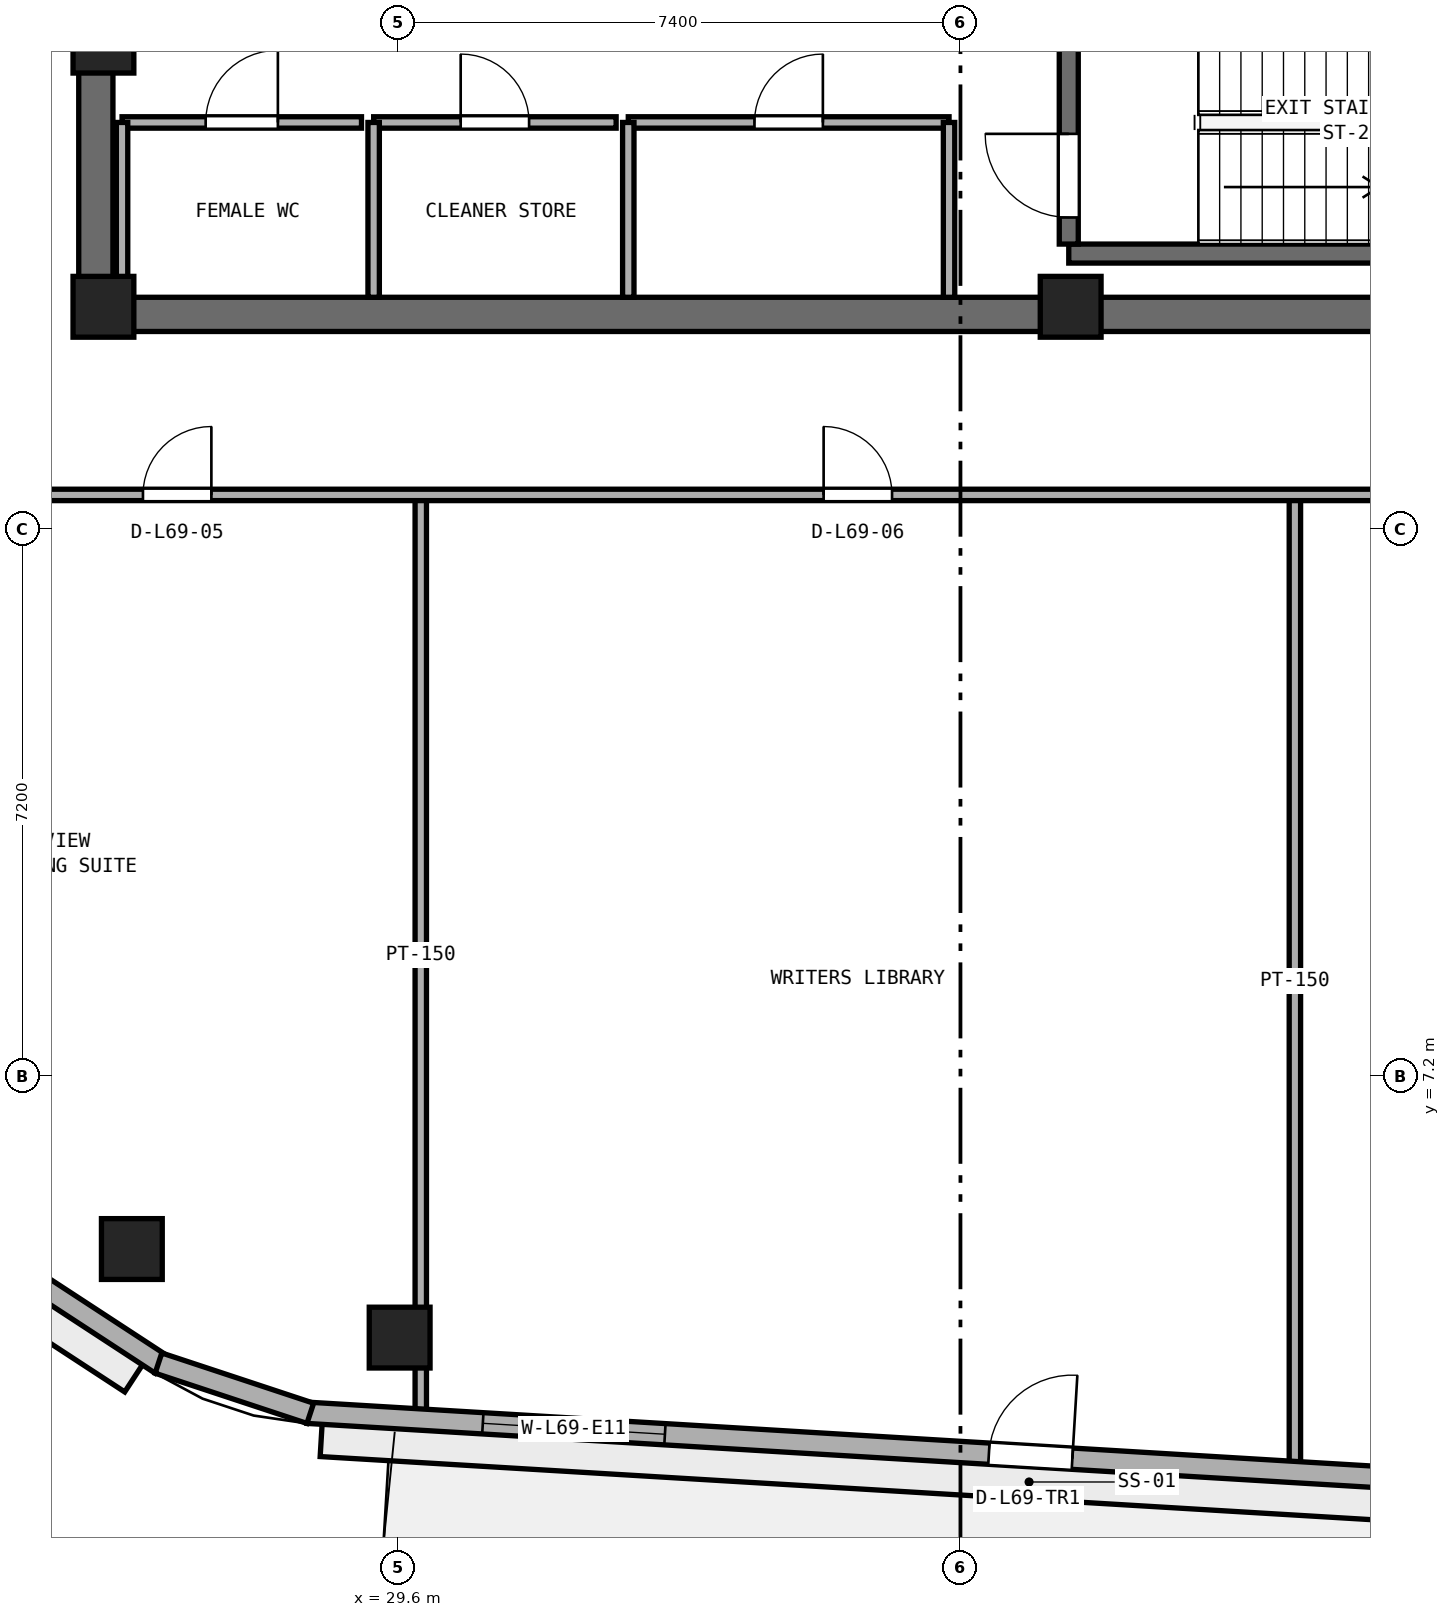
"""IFC4 building model, lengths in metres.
Left out: names, types, materials, properties, quantities, classifications, styles, units other than length and angle.
Written with IfcOpenShell. Run it as: python <this file> out.ifc"""

import sys

from ifc_helpers import new_model, si_unit, direction, frame, frame_2d, origin, origin_2d, place, context, subcontext, project, spatial, rectangle, extrude, element, fill, save


model = new_model("IFC4")
c1 = context("Model", 3, precision=1e-05, world=origin(), true_north=direction((0.0, 1.0)))
c2 = subcontext(c1, "Body", "Model", "MODEL_VIEW")
j1 = project(units=[si_unit("LENGTHUNIT", "METRE"), si_unit("PLANEANGLEUNIT", "RADIAN")], contexts=[c1])
p1 = place(None, origin())
s1 = spatial("IfcSite", under=j1, at=p1, CompositionType="ELEMENT")
p2 = place(p1, origin())
s2 = spatial("IfcBuilding", under=s1, at=p2, CompositionType="ELEMENT")
p3 = place(p2, frame((0.0, 0.0, 270.6)))
s3 = spatial("IfcBuildingStorey", under=s2, at=p3, CompositionType="ELEMENT", Elevation=270.6)
p4 = place(p3, frame((25.4, 17.225, 0.0), z_axis=(0.0, 0.0, 1.0), x_axis=(1.0, 0.0, 0.0)))
e1 = element("IfcWall", 1, at=p4, inside=s3, PredefinedType="SHEAR", context=c2, shape_type="SweptSolid", body=[
    extrude(rectangle(XDim=23.2, YDim=0.45, at=frame_2d((11.6, 0.0))), origin(), (0.0, 0.0, 1.0), 3.54),
])
p5 = place(p3, frame((25.625, 17.45, 0.0), z_axis=(0.0, 0.0, 1.0), x_axis=(0.0, 1.0, 0.0)))
e2 = element("IfcWall", 2, at=p5, inside=s3, PredefinedType="SHEAR", context=c2, shape_type="SweptSolid", body=[
    extrude(rectangle(XDim=15.5, YDim=0.45, at=frame_2d((7.75, 0.0))), origin(), (0.0, 0.0, 1.0), 3.54),
])
p6 = place(p5, frame((7.0, 0.0, 0.0)))
e3 = element("IfcOpeningElement", 3, at=p6, cuts=e2, PredefinedType="OPENING", context=c2, shape_type="SweptSolid", body=[
    extrude(rectangle(XDim=1.5, YDim=2.15, at=frame_2d((0.75, 1.075))), frame((0.0, 0.235, 0.0), z_axis=(0.0, -1.0, 0.0), x_axis=(1.0, 0.0, 0.0)), (0.0, 0.0, 1.0), 0.47),
])
for number, where, z_axis, x_axis in (
    (4, (25.725, 17.325, 0.0), (0.0, 0.0, 1.0), (1.0, 0.0, 0.0)),
    (5, (38.45, 17.325, 0.0), (0.0, 0.0, 1.0), (1.0, 0.0, 0.0)),
    (6, (25.725, 20.8, 0.0), (0.0, 0.0, 1.0), (1.0, 0.0, 0.0)),
):
    element("IfcColumn", number, at=place(p3, frame(where, z_axis=z_axis, x_axis=x_axis)), inside=s3, PredefinedType="PILASTER", context=c2, shape_type="SweptSolid", body=[
        extrude(rectangle(XDim=0.8, YDim=0.8, at=origin_2d()), origin(), (0.0, 0.0, 1.0), 3.8),
    ])
for number, where, z_axis, x_axis in (
    (7, (29.622, 3.764, 0.0), (0.0, 0.0, 1.0), (1.0, 0.0, 0.0)),
    (8, (26.099, 4.929, 0.0), (0.0, 0.0, 1.0), (1.0, 0.0, 0.0)),
):
    element("IfcColumn", number, at=place(p3, frame(where, z_axis=z_axis, x_axis=x_axis)), inside=s3, PredefinedType="COLUMN", context=c2, shape_type="SweptSolid", body=[
        extrude(rectangle(XDim=0.8, YDim=0.8, at=origin_2d()), origin(), (0.0, 0.0, 1.0), 3.8),
    ])
p7 = place(p3, frame((38.425, 18.025, 0.0), z_axis=(0.0, 0.0, 1.0), x_axis=(1.0, 0.0, 0.0)))
e9 = element("IfcWall", 9, at=p7, inside=s3, PredefinedType="SHEAR", context=c2, shape_type="SweptSolid", body=[
    extrude(rectangle(XDim=7.3, YDim=0.25, at=frame_2d((3.65, 0.0))), origin(), (0.0, 0.0, 1.0), 3.54),
])
p8 = place(p3, frame((38.425, 18.15, 0.0), z_axis=(0.0, 0.0, 1.0), x_axis=(0.0, 1.0, 0.0)))
e10 = element("IfcWall", 10, at=p8, inside=s3, PredefinedType="SHEAR", context=c2, shape_type="SweptSolid", body=[
    extrude(rectangle(XDim=3.2, YDim=0.25, at=frame_2d((1.6, 0.0))), origin(), (0.0, 0.0, 1.0), 3.54),
])
p9 = place(p8, frame((0.35, 0.0, 0.0)))
e11 = element("IfcOpeningElement", 11, at=p9, cuts=e10, PredefinedType="OPENING", context=c2, shape_type="SweptSolid", body=[
    extrude(rectangle(XDim=1.1, YDim=2.15, at=frame_2d((0.55, 1.075))), frame((0.0, 0.135, 0.0), z_axis=(0.0, -1.0, 0.0), x_axis=(1.0, 0.0, 0.0)), (0.0, 0.0, 1.0), 0.27),
])
p10 = place(p3, frame((25.97, 19.75, 0.0), z_axis=(0.0, 0.0, 1.0), x_axis=(1.0, 0.0, 0.0)))
e12 = element("IfcWall", 12, at=p10, inside=s3, PredefinedType="PARTITIONING", context=c2, shape_type="SweptSolid", body=[
    extrude(rectangle(XDim=3.15, YDim=0.15, at=frame_2d((1.575, 0.0))), origin(), (0.0, 0.0, 1.0), 3.54),
])
p11 = place(p10, frame((1.1, 0.0, 0.0)))
e13 = element("IfcOpeningElement", 13, at=p11, cuts=e12, PredefinedType="OPENING", context=c2, shape_type="SweptSolid", body=[
    extrude(rectangle(XDim=0.95, YDim=2.1, at=frame_2d((0.475, 1.05))), frame((0.0, 0.085, 0.0), z_axis=(0.0, -1.0, 0.0), x_axis=(1.0, 0.0, 0.0)), (0.0, 0.0, 1.0), 0.17),
])
p12 = place(p3, frame((25.97, 17.45, 0.0), z_axis=(0.0, 0.0, 1.0), x_axis=(0.0, 1.0, 0.0)))
e14 = element("IfcWall", 14, at=p12, inside=s3, PredefinedType="PARTITIONING", context=c2, shape_type="SweptSolid", body=[
    extrude(rectangle(XDim=2.3, YDim=0.15, at=frame_2d((1.15, 0.0))), origin(), (0.0, 0.0, 1.0), 2.64),
])
p13 = place(p3, frame((29.28, 19.75, 0.0), z_axis=(0.0, 0.0, 1.0), x_axis=(1.0, 0.0, 0.0)))
e15 = element("IfcWall", 15, at=p13, inside=s3, PredefinedType="PARTITIONING", context=c2, shape_type="SweptSolid", body=[
    extrude(rectangle(XDim=3.19, YDim=0.15, at=frame_2d((1.595, 0.0))), origin(), (0.0, 0.0, 1.0), 3.54),
])
p14 = place(p13, frame((1.145, 0.0, 0.0)))
e16 = element("IfcOpeningElement", 16, at=p14, cuts=e15, PredefinedType="OPENING", context=c2, shape_type="SweptSolid", body=[
    extrude(rectangle(XDim=0.9, YDim=2.1, at=frame_2d((0.45, 1.05))), frame((0.0, 0.085, 0.0), z_axis=(0.0, -1.0, 0.0), x_axis=(1.0, 0.0, 0.0)), (0.0, 0.0, 1.0), 0.17),
])
p15 = place(p3, frame((29.28, 17.45, 0.0), z_axis=(0.0, 0.0, 1.0), x_axis=(0.0, 1.0, 0.0)))
e17 = element("IfcWall", 17, at=p15, inside=s3, PredefinedType="PARTITIONING", context=c2, shape_type="SweptSolid", body=[
    extrude(rectangle(XDim=2.3, YDim=0.15, at=frame_2d((1.15, 0.0))), origin(), (0.0, 0.0, 1.0), 3.54),
])
p16 = place(p3, frame((32.63, 19.75, 0.0), z_axis=(0.0, 0.0, 1.0), x_axis=(1.0, 0.0, 0.0)))
e18 = element("IfcWall", 18, at=p16, inside=s3, PredefinedType="PARTITIONING", context=c2, shape_type="SweptSolid", body=[
    extrude(rectangle(XDim=4.22, YDim=0.15, at=frame_2d((2.11, 0.0))), origin(), (0.0, 0.0, 1.0), 3.54),
])
p17 = place(p16, frame((1.66, 0.0, 0.0)))
e19 = element("IfcOpeningElement", 19, at=p17, cuts=e18, PredefinedType="OPENING", context=c2, shape_type="SweptSolid", body=[
    extrude(rectangle(XDim=0.9, YDim=2.1, at=frame_2d((0.45, 1.05))), frame((0.0, 0.085, 0.0), z_axis=(0.0, -1.0, 0.0), x_axis=(1.0, 0.0, 0.0)), (0.0, 0.0, 1.0), 0.17),
])
for number, where, z_axis, x_axis in (
    (20, (32.63, 17.45, 0.0), (0.0, 0.0, 1.0), (0.0, 1.0, 0.0)),
    (21, (36.85, 17.45, 0.0), (0.0, 0.0, 1.0), (0.0, 1.0, 0.0)),
):
    element("IfcWall", number, at=place(p3, frame(where, z_axis=z_axis, x_axis=x_axis)), inside=s3, PredefinedType="PARTITIONING", context=c2, shape_type="SweptSolid", body=[
        extrude(rectangle(XDim=2.3, YDim=0.15, at=frame_2d((1.15, 0.0))), origin(), (0.0, 0.0, 1.0), 3.54),
    ])
p18 = place(p3, frame((41.4, 2.06, 0.0), z_axis=(0.0, 0.0, 1.0), x_axis=(0.0, 1.0, 0.0)))
e22 = element("IfcWall", 22, at=p18, inside=s3, PredefinedType="PARTITIONING", context=c2, shape_type="SweptSolid", body=[
    extrude(rectangle(XDim=12.791, YDim=0.15, at=frame_2d((6.395, 0.0))), origin(), (0.0, 0.0, 1.0), 3.54),
])
p19 = place(p3, frame((29.9, 2.75, 0.0), z_axis=(0.0, 0.0, 1.0), x_axis=(0.0, 1.0, 0.0)))
e23 = element("IfcWall", 23, at=p19, inside=s3, PredefinedType="PARTITIONING", context=c2, shape_type="SweptSolid", body=[
    extrude(rectangle(XDim=12.1, YDim=0.15, at=frame_2d((6.05, 0.0))), origin(), (0.0, 0.0, 1.0), 3.54),
])
p20 = place(p3, frame((23.25, 14.85, 0.0), z_axis=(0.0, 0.0, 1.0), x_axis=(1.0, 0.0, 0.0)))
e24 = element("IfcWall", 24, at=p20, inside=s3, PredefinedType="PARTITIONING", context=c2, shape_type="SweptSolid", body=[
    extrude(rectangle(XDim=25.35, YDim=0.15, at=frame_2d((12.675, 0.0))), origin(), (0.0, 0.0, 1.0), 3.54),
])
p21 = place(p20, frame((2.995, 0.0, 0.0)))
e25 = element("IfcOpeningElement", 25, at=p21, cuts=e24, PredefinedType="OPENING", context=c2, shape_type="SweptSolid", body=[
    extrude(rectangle(XDim=0.9, YDim=2.1, at=frame_2d((0.45, 1.05))), frame((0.0, 0.085, 0.0), z_axis=(0.0, -1.0, 0.0), x_axis=(1.0, 0.0, 0.0)), (0.0, 0.0, 1.0), 0.17),
])
p22 = place(p20, frame((11.95, 0.0, 0.0)))
e26 = element("IfcOpeningElement", 26, at=p22, cuts=e24, PredefinedType="OPENING", context=c2, shape_type="SweptSolid", body=[
    extrude(rectangle(XDim=0.9, YDim=2.1, at=frame_2d((0.45, 1.05))), frame((0.0, 0.085, 0.0), z_axis=(0.0, -1.0, 0.0), x_axis=(1.0, 0.0, 0.0)), (0.0, 0.0, 1.0), 0.17),
])
p23 = place(p20, frame((21.18, 0.0, 0.0)))
e27 = element("IfcOpeningElement", 27, at=p23, cuts=e24, PredefinedType="OPENING", context=c2, shape_type="SweptSolid", body=[
    extrude(rectangle(XDim=0.9, YDim=2.1, at=frame_2d((0.45, 1.05))), frame((0.0, 0.085, 0.0), z_axis=(0.0, -1.0, 0.0), x_axis=(1.0, 0.0, 0.0)), (0.0, 0.0, 1.0), 0.17),
])
p24 = place(p3, frame((28.411, 2.774, 0.0), z_axis=(0.0, 0.0, 1.0), x_axis=(0.998203068368, -0.059921901676, 0.0)))
e28 = element("IfcWall", 28, at=p24, inside=s3, PredefinedType="STANDARD", context=c2, shape_type="SweptSolid", body=[
    extrude(rectangle(XDim=19.06, YDim=0.28, at=frame_2d((9.53, 0.0))), origin(), (0.0, 0.0, 1.0), 3.54),
])
p25 = place(p24, frame((8.98, 0.0, 0.0)))
e29 = element("IfcOpeningElement", 29, at=p25, cuts=e28, PredefinedType="OPENING", context=c2, shape_type="SweptSolid", body=[
    extrude(rectangle(XDim=1.1, YDim=2.2, at=frame_2d((0.55, 1.1))), frame((0.0, 0.15, 0.0), z_axis=(0.0, -1.0, 0.0), x_axis=(1.0, 0.0, 0.0)), (0.0, 0.0, 1.0), 0.3),
])
p26 = place(p24, frame((2.31, 0.0, 0.9)))
e30 = element("IfcOpeningElement", 30, at=p26, cuts=e28, PredefinedType="OPENING", context=c2, shape_type="SweptSolid", body=[
    extrude(rectangle(XDim=2.4, YDim=1.75, at=frame_2d((1.2, 0.875))), frame((0.0, 0.15, 0.0), z_axis=(0.0, -1.0, 0.0), x_axis=(1.0, 0.0, 0.0)), (0.0, 0.0, 1.0), 0.3),
])
p27 = place(p24, frame((14.35, 0.0, 0.9)))
e31 = element("IfcOpeningElement", 31, at=p27, cuts=e28, PredefinedType="OPENING", context=c2, shape_type="SweptSolid", body=[
    extrude(rectangle(XDim=2.4, YDim=1.75, at=frame_2d((1.2, 0.875))), frame((0.0, 0.15, 0.0), z_axis=(0.0, -1.0, 0.0), x_axis=(1.0, 0.0, 0.0)), (0.0, 0.0, 1.0), 0.3),
])
p28 = place(p3, frame((12.034, 12.854, 0.0), z_axis=(0.0, 0.0, 1.0), x_axis=(0.837118352984, -0.547021812269, 0.0)))
e32 = element("IfcWall", 32, at=p28, inside=s3, PredefinedType="STANDARD", context=c2, shape_type="SweptSolid", body=[
    extrude(rectangle(XDim=17.259, YDim=0.28, at=frame_2d((8.63, 0.0))), origin(), (0.0, 0.0, 1.0), 3.54),
])
p29 = place(p28, frame((2.01, 0.0, 0.9)))
e33 = element("IfcOpeningElement", 33, at=p29, cuts=e32, PredefinedType="OPENING", context=c2, shape_type="SweptSolid", body=[
    extrude(rectangle(XDim=2.4, YDim=1.75, at=frame_2d((1.2, 0.875))), frame((0.0, 0.15, 0.0), z_axis=(0.0, -1.0, 0.0), x_axis=(1.0, 0.0, 0.0)), (0.0, 0.0, 1.0), 0.3),
])
p30 = place(p28, frame((7.43, 0.0, 0.9)))
e34 = element("IfcOpeningElement", 34, at=p30, cuts=e32, PredefinedType="OPENING", context=c2, shape_type="SweptSolid", body=[
    extrude(rectangle(XDim=2.4, YDim=1.75, at=frame_2d((1.2, 0.875))), frame((0.0, 0.15, 0.0), z_axis=(0.0, -1.0, 0.0), x_axis=(1.0, 0.0, 0.0)), (0.0, 0.0, 1.0), 0.3),
])
p31 = place(p28, frame((12.849, 0.0, 0.9)))
e35 = element("IfcOpeningElement", 35, at=p31, cuts=e32, PredefinedType="OPENING", context=c2, shape_type="SweptSolid", body=[
    extrude(rectangle(XDim=2.4, YDim=1.75, at=frame_2d((1.2, 0.875))), frame((0.0, 0.15, 0.0), z_axis=(0.0, -1.0, 0.0), x_axis=(1.0, 0.0, 0.0)), (0.0, 0.0, 1.0), 0.3),
])
p32 = place(p3, frame((26.449, 3.428, 0.0), z_axis=(0.0, 0.0, 1.0), x_axis=(0.949435039229, -0.313963542923, 0.0)))
e36 = element("IfcWall", 36, at=p32, inside=s3, PredefinedType="STANDARD", context=c2, shape_type="SweptSolid", body=[
    extrude(rectangle(XDim=2.104, YDim=0.28, at=frame_2d((1.052, 0.0))), origin(), (0.0, 0.0, 1.0), 3.54),
])
p33 = place(p9, origin())
e37 = element("IfcDoor", 37, at=p33, inside=s3, OperationType="SINGLE_SWING_RIGHT", PredefinedType="DOOR", context=c2, shape_type="SweptSolid", body=[
    extrude(rectangle(XDim=1.1, YDim=2.15, at=frame_2d((0.55, 1.075))), frame((0.0, 0.025, 0.0), z_axis=(0.0, -1.0, 0.0), x_axis=(1.0, 0.0, 0.0)), (0.0, 0.0, 1.0), 0.05),
])
fill(e11, e37)
p34 = place(p11, origin())
e38 = element("IfcDoor", 38, at=p34, inside=s3, OperationType="SINGLE_SWING_RIGHT", PredefinedType="DOOR", context=c2, shape_type="SweptSolid", body=[
    extrude(rectangle(XDim=0.95, YDim=2.1, at=frame_2d((0.475, 1.05))), frame((0.0, 0.025, 0.0), z_axis=(0.0, -1.0, 0.0), x_axis=(1.0, 0.0, 0.0)), (0.0, 0.0, 1.0), 0.05),
])
fill(e13, e38)
p35 = place(p14, origin())
e39 = element("IfcDoor", 39, at=p35, inside=s3, OperationType="SINGLE_SWING_LEFT", PredefinedType="DOOR", context=c2, shape_type="SweptSolid", body=[
    extrude(rectangle(XDim=0.9, YDim=2.1, at=frame_2d((0.45, 1.05))), frame((0.0, 0.025, 0.0), z_axis=(0.0, -1.0, 0.0), x_axis=(1.0, 0.0, 0.0)), (0.0, 0.0, 1.0), 0.05),
])
fill(e16, e39)
p36 = place(p17, origin())
e40 = element("IfcDoor", 40, at=p36, inside=s3, OperationType="SINGLE_SWING_RIGHT", PredefinedType="DOOR", context=c2, shape_type="SweptSolid", body=[
    extrude(rectangle(XDim=0.9, YDim=2.1, at=frame_2d((0.45, 1.05))), frame((0.0, 0.025, 0.0), z_axis=(0.0, -1.0, 0.0), x_axis=(1.0, 0.0, 0.0)), (0.0, 0.0, 1.0), 0.05),
])
fill(e19, e40)
p37 = place(p21, origin())
e41 = element("IfcDoor", 41, at=p37, inside=s3, OperationType="SINGLE_SWING_RIGHT", PredefinedType="DOOR", context=c2, shape_type="SweptSolid", body=[
    extrude(rectangle(XDim=0.9, YDim=2.1, at=frame_2d((0.45, 1.05))), frame((0.0, 0.025, 0.0), z_axis=(0.0, -1.0, 0.0), x_axis=(1.0, 0.0, 0.0)), (0.0, 0.0, 1.0), 0.05),
])
fill(e25, e41)
p38 = place(p22, origin())
e42 = element("IfcDoor", 42, at=p38, inside=s3, OperationType="SINGLE_SWING_LEFT", PredefinedType="DOOR", context=c2, shape_type="SweptSolid", body=[
    extrude(rectangle(XDim=0.9, YDim=2.1, at=frame_2d((0.45, 1.05))), frame((0.0, 0.025, 0.0), z_axis=(0.0, -1.0, 0.0), x_axis=(1.0, 0.0, 0.0)), (0.0, 0.0, 1.0), 0.05),
])
fill(e26, e42)
p39 = place(p25, origin())
e43 = element("IfcDoor", 43, at=p39, inside=s3, OperationType="SINGLE_SWING_RIGHT", PredefinedType="DOOR", context=c2, shape_type="SweptSolid", body=[
    extrude(rectangle(XDim=1.1, YDim=2.2, at=frame_2d((0.55, 1.1))), frame((0.0, 0.025, 0.0), z_axis=(0.0, -1.0, 0.0), x_axis=(1.0, 0.0, 0.0)), (0.0, 0.0, 1.0), 0.05),
])
fill(e29, e43)
p40 = place(p26, origin())
e44 = element("IfcWindow", 44, at=p40, inside=s3, PartitioningType="SINGLE_PANEL", PredefinedType="WINDOW", context=c2, shape_type="SweptSolid", body=[
    extrude(rectangle(XDim=2.4, YDim=1.75, at=frame_2d((1.2, 0.875))), frame((0.0, 0.03, 0.0), z_axis=(0.0, -1.0, 0.0), x_axis=(1.0, 0.0, 0.0)), (0.0, 0.0, 1.0), 0.06),
])
fill(e30, e44)
save(model, sys.argv[1])
